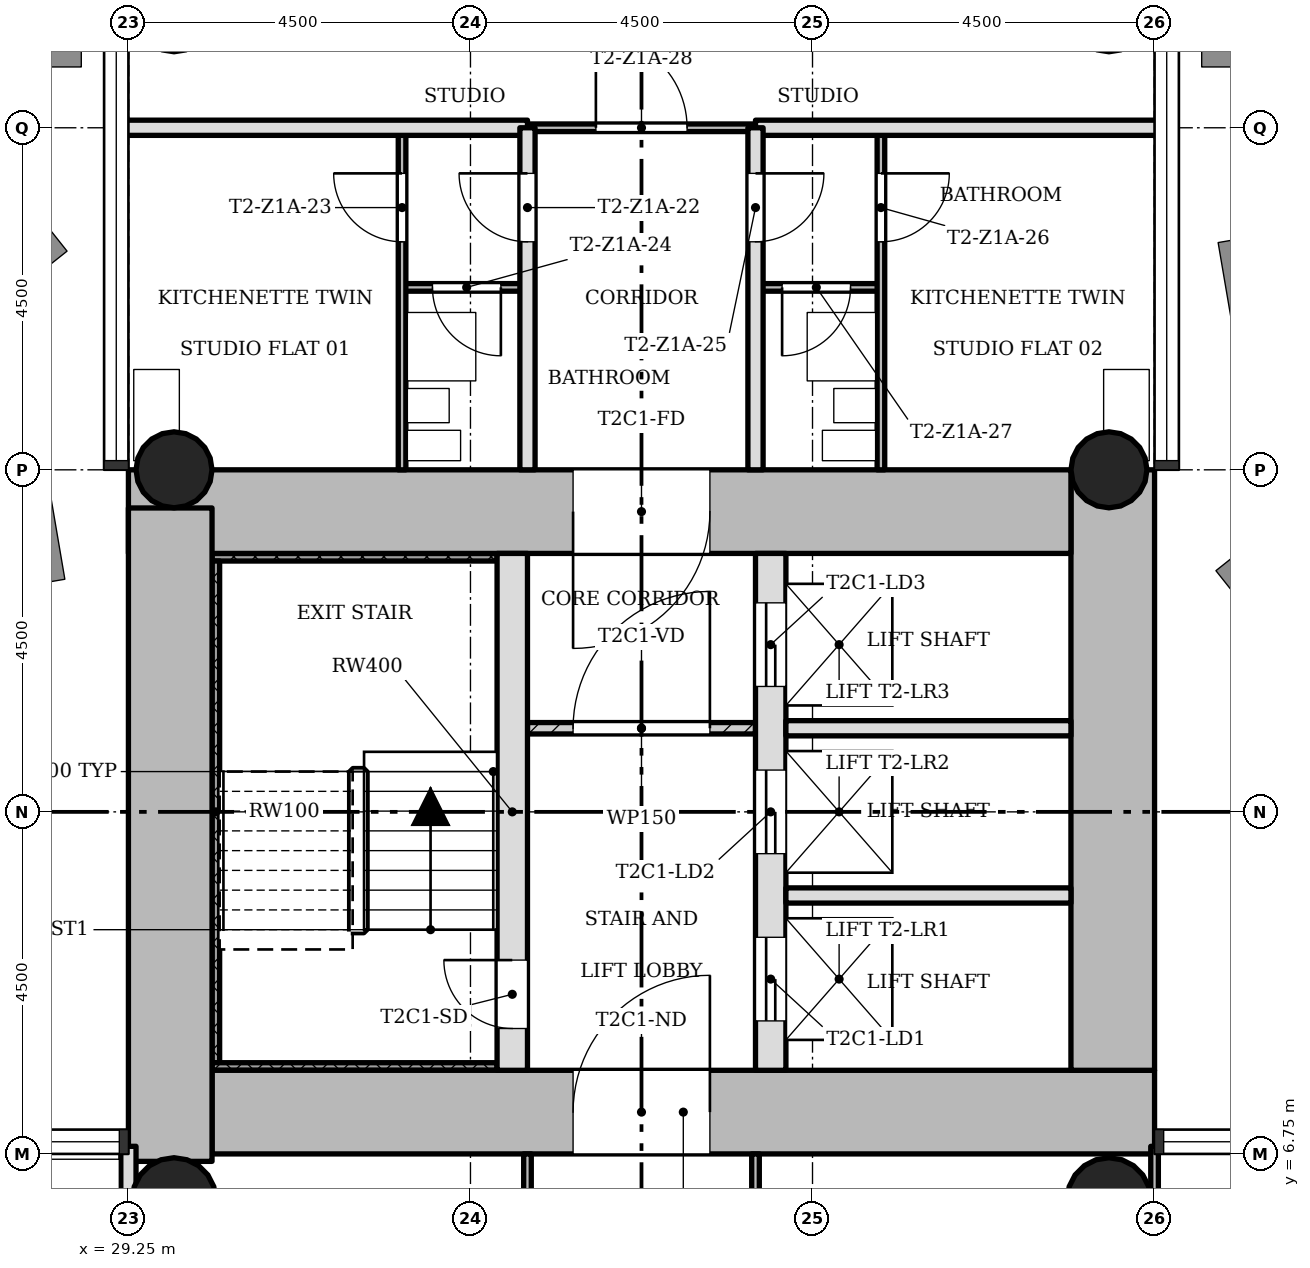
"""IFC4 building model, lengths in metres.
Left out: names, types, materials, properties, quantities, classifications, styles, units other than length and angle.
Written with IfcOpenShell. Run it as: python <this file> out.ifc"""

import sys

from ifc_helpers import new_model, si_unit, direction, frame, frame_2d, origin, origin_2d, place, context, subcontext, project, spatial, rectangle, hollow_circle, extrude, element, fill, save


model = new_model("IFC4")
c1 = context("Model", 3, precision=1e-05, world=origin(), true_north=direction((0.0, 1.0)))
c2 = subcontext(c1, "Body", "Model", "MODEL_VIEW")
j1 = project(units=[si_unit("LENGTHUNIT", "METRE"), si_unit("PLANEANGLEUNIT", "RADIAN")], contexts=[c1])
p1 = place(None, origin())
s1 = spatial("IfcSite", under=j1, at=p1, CompositionType="ELEMENT")
p2 = place(p1, origin())
s2 = spatial("IfcBuilding", under=s1, at=p2, CompositionType="ELEMENT")
p3 = place(p2, frame((0.0, 0.0, 24.5)))
s3 = spatial("IfcBuildingStorey", under=s2, at=p3, CompositionType="ELEMENT", Elevation=24.5)
p4 = place(p3, frame((30.35, 7.3, 0.0), z_axis=(0.0, 0.0, 1.0), x_axis=(1.0, 0.0, 0.0)))
e1 = element("IfcWall", 1, at=p4, inside=s3, PredefinedType="SHEAR", context=c2, shape_type="SweptSolid", body=[
    extrude(rectangle(XDim=12.4, YDim=1.1, at=frame_2d((6.2, 0.0))), origin(), (0.0, 0.0, 1.0), 3.4),
])
p5 = place(p4, frame((4.75, 0.0, 0.0)))
e2 = element("IfcOpeningElement", 2, at=p5, cuts=e1, PredefinedType="OPENING", context=c2, shape_type="SweptSolid", body=[
    extrude(rectangle(XDim=1.8, YDim=2.1, at=frame_2d((0.9, 1.05))), frame((0.0, 0.56, 0.0), z_axis=(0.0, -1.0, 0.0), x_axis=(1.0, 0.0, 0.0)), (0.0, 0.0, 1.0), 1.12),
])
p6 = place(p3, frame((42.2, 7.85, 0.0), z_axis=(0.0, 0.0, 1.0), x_axis=(0.0, 1.0, 0.0)))
e3 = element("IfcWall", 3, at=p6, inside=s3, PredefinedType="SHEAR", context=c2, shape_type="SweptSolid", body=[
    extrude(rectangle(XDim=7.9, YDim=1.1, at=frame_2d((3.95, 0.0))), origin(), (0.0, 0.0, 1.0), 3.4),
])
p7 = place(p3, frame((41.65, 15.2, 0.0), z_axis=(0.0, 0.0, 1.0), x_axis=(-1.0, 0.0, 0.0)))
e4 = element("IfcWall", 4, at=p7, inside=s3, PredefinedType="SHEAR", context=c2, shape_type="SweptSolid", body=[
    extrude(rectangle(XDim=12.4, YDim=1.1, at=frame_2d((6.2, 0.0))), origin(), (0.0, 0.0, 1.0), 3.4),
])
p8 = place(p7, frame((4.75, 0.0, 0.0)))
e5 = element("IfcOpeningElement", 5, at=p8, cuts=e4, PredefinedType="OPENING", context=c2, shape_type="SweptSolid", body=[
    extrude(rectangle(XDim=1.8, YDim=2.1, at=frame_2d((0.9, 1.05))), frame((0.0, 0.56, 0.0), z_axis=(0.0, -1.0, 0.0), x_axis=(1.0, 0.0, 0.0)), (0.0, 0.0, 1.0), 1.12),
])
p9 = place(p3, frame((29.8, 15.248, 0.0), z_axis=(0.0, 0.0, 1.0), x_axis=(0.0, -1.0, 0.0)))
e6 = element("IfcWall", 6, at=p9, inside=s3, PredefinedType="SHEAR", context=c2, shape_type="SweptSolid", body=[
    extrude(rectangle(XDim=8.596, YDim=1.1, at=frame_2d((4.298, 0.0))), origin(), (0.0, 0.0, 1.0), 3.4),
])
p10 = place(p3, frame((34.3, 7.85, 0.0), z_axis=(0.0, 0.0, 1.0), x_axis=(0.0, 1.0, 0.0)))
e7 = element("IfcWall", 7, at=p10, inside=s3, PredefinedType="SHEAR", context=c2, shape_type="SweptSolid", body=[
    extrude(rectangle(XDim=6.8, YDim=0.4, at=frame_2d((3.4, 0.0))), origin(), (0.0, 0.0, 1.0), 3.4),
])
p11 = place(p10, frame((0.55, 0.0, 0.0)))
e8 = element("IfcOpeningElement", 8, at=p11, cuts=e7, PredefinedType="OPENING", context=c2, shape_type="SweptSolid", body=[
    extrude(rectangle(XDim=0.9, YDim=2.1, at=frame_2d((0.45, 1.05))), frame((0.0, 0.21, 0.0), z_axis=(0.0, -1.0, 0.0), x_axis=(1.0, 0.0, 0.0)), (0.0, 0.0, 1.0), 0.42),
])
p12 = place(p3, frame((37.7, 7.85, 0.0), z_axis=(0.0, 0.0, 1.0), x_axis=(0.0, 1.0, 0.0)))
e9 = element("IfcWall", 9, at=p12, inside=s3, PredefinedType="SHEAR", context=c2, shape_type="SweptSolid", body=[
    extrude(rectangle(XDim=6.8, YDim=0.4, at=frame_2d((3.4, 0.0))), origin(), (0.0, 0.0, 1.0), 3.4),
])
p13 = place(p12, frame((0.65, 0.0, 0.0)))
e10 = element("IfcOpeningElement", 10, at=p13, cuts=e9, PredefinedType="OPENING", context=c2, shape_type="SweptSolid", body=[
    extrude(rectangle(XDim=1.1, YDim=2.1, at=frame_2d((0.55, 1.05))), frame((0.0, 0.21, 0.0), z_axis=(0.0, -1.0, 0.0), x_axis=(1.0, 0.0, 0.0)), (0.0, 0.0, 1.0), 0.42),
])
p14 = place(p12, frame((2.85, 0.0, 0.0)))
e11 = element("IfcOpeningElement", 11, at=p14, cuts=e9, PredefinedType="OPENING", context=c2, shape_type="SweptSolid", body=[
    extrude(rectangle(XDim=1.1, YDim=2.1, at=frame_2d((0.55, 1.05))), frame((0.0, 0.21, 0.0), z_axis=(0.0, -1.0, 0.0), x_axis=(1.0, 0.0, 0.0)), (0.0, 0.0, 1.0), 0.42),
])
p15 = place(p12, frame((5.05, 0.0, 0.0)))
e12 = element("IfcOpeningElement", 12, at=p15, cuts=e9, PredefinedType="OPENING", context=c2, shape_type="SweptSolid", body=[
    extrude(rectangle(XDim=1.1, YDim=2.1, at=frame_2d((0.55, 1.05))), frame((0.0, 0.21, 0.0), z_axis=(0.0, -1.0, 0.0), x_axis=(1.0, 0.0, 0.0)), (0.0, 0.0, 1.0), 0.42),
])
for number, where, z_axis, x_axis in (
    (13, (42.15, 15.75, 0.0), (0.0, 0.0, 1.0), (1.0, 0.0, 0.0)),
    (14, (29.85, 15.75, 0.0), (0.0, 0.0, 1.0), (1.0, 0.0, 0.0)),
):
    element("IfcColumn", number, at=place(p3, frame(where, z_axis=z_axis, x_axis=x_axis)), inside=s3, PredefinedType="COLUMN", context=c2, shape_type="SweptSolid", body=[
        extrude(hollow_circle(Radius=0.5, WallThickness=0.036, at=origin_2d()), origin(), (0.0, 0.0, 1.0), 3.4),
    ])
for number, where, z_axis, x_axis in (
    (15, (42.15, 6.15, 0.0), (0.0, 0.0, 1.0), (1.0, 0.0, 0.0)),
    (16, (29.85, 6.15, 0.0), (0.0, 0.0, 1.0), (1.0, 0.0, 0.0)),
):
    element("IfcColumn", number, at=place(p3, frame(where, z_axis=z_axis, x_axis=x_axis)), inside=s3, PredefinedType="COLUMN", context=c2, shape_type="SweptSolid", body=[
        extrude(hollow_circle(Radius=0.55, WallThickness=0.04, at=origin_2d()), origin(), (0.0, 0.0, 1.0), 3.4),
    ])
p16 = place(p3, frame((37.5, 12.35, 0.0), z_axis=(0.0, 0.0, 1.0), x_axis=(-1.0, 0.0, 0.0)))
e17 = element("IfcWall", 17, at=p16, inside=s3, PredefinedType="PARTITIONING", context=c2, shape_type="SweptSolid", body=[
    extrude(rectangle(XDim=3.0, YDim=0.15, at=frame_2d((1.5, 0.0))), origin(), (0.0, 0.0, 1.0), 3.0),
])
p17 = place(p16, frame((0.6, 0.0, 0.0)))
e18 = element("IfcOpeningElement", 18, at=p17, cuts=e17, PredefinedType="OPENING", context=c2, shape_type="SweptSolid", body=[
    extrude(rectangle(XDim=1.8, YDim=2.1, at=frame_2d((0.9, 1.05))), frame((0.0, 0.085, 0.0), z_axis=(0.0, -1.0, 0.0), x_axis=(1.0, 0.0, 0.0)), (0.0, 0.0, 1.0), 0.17),
])
for number, where, z_axis, x_axis in (
    (19, (41.65, 10.15, 0.0), (0.0, 0.0, 1.0), (-1.0, 0.0, 0.0)),
    (20, (41.65, 12.35, 0.0), (0.0, 0.0, 1.0), (-1.0, 0.0, 0.0)),
):
    element("IfcWall", number, at=place(p3, frame(where, z_axis=z_axis, x_axis=x_axis)), inside=s3, PredefinedType="SOLIDWALL", context=c2, shape_type="SweptSolid", body=[
        extrude(rectangle(XDim=3.75, YDim=0.2, at=frame_2d((1.875, 0.0))), origin(), (0.0, 0.0, 1.0), 3.0),
    ])
p18 = place(p3, frame((39.15, 18.15, 0.0), z_axis=(0.0, 0.0, 1.0), x_axis=(-1.0, 0.0, 0.0)))
e21 = element("IfcWall", 21, at=p18, inside=s3, PredefinedType="PARTITIONING", context=c2, shape_type="SweptSolid", body=[
    extrude(rectangle(XDim=1.65, YDim=0.1, at=frame_2d((0.825, 0.0))), origin(), (0.0, 0.0, 1.0), 3.0),
])
p19 = place(p18, frame((0.4, 0.0, 0.0)))
e22 = element("IfcOpeningElement", 22, at=p19, cuts=e21, PredefinedType="OPENING", context=c2, shape_type="SweptSolid", body=[
    extrude(rectangle(XDim=0.9, YDim=2.1, at=frame_2d((0.45, 1.05))), frame((0.0, 0.06, 0.0), z_axis=(0.0, -1.0, 0.0), x_axis=(1.0, 0.0, 0.0)), (0.0, 0.0, 1.0), 0.12),
])
p20 = place(p3, frame((34.5, 18.15, 0.0), z_axis=(0.0, 0.0, 1.0), x_axis=(-1.0, 0.0, 0.0)))
e23 = element("IfcWall", 23, at=p20, inside=s3, PredefinedType="PARTITIONING", context=c2, shape_type="SweptSolid", body=[
    extrude(rectangle(XDim=1.65, YDim=0.1, at=frame_2d((0.825, 0.0))), origin(), (0.0, 0.0, 1.0), 3.0),
])
p21 = place(p20, frame((0.35, 0.0, 0.0)))
e24 = element("IfcOpeningElement", 24, at=p21, cuts=e23, PredefinedType="OPENING", context=c2, shape_type="SweptSolid", body=[
    extrude(rectangle(XDim=0.9, YDim=2.1, at=frame_2d((0.45, 1.05))), frame((0.0, 0.06, 0.0), z_axis=(0.0, -1.0, 0.0), x_axis=(1.0, 0.0, 0.0)), (0.0, 0.0, 1.0), 0.12),
])
p22 = place(p3, frame((37.5, 20.25, 0.0), z_axis=(0.0, 0.0, 1.0), x_axis=(-1.0, 0.0, 0.0)))
e25 = element("IfcWall", 25, at=p22, inside=s3, PredefinedType="PARTITIONING", context=c2, shape_type="SweptSolid", body=[
    extrude(rectangle(XDim=3.0, YDim=0.1, at=frame_2d((1.5, 0.0))), origin(), (0.0, 0.0, 1.0), 3.0),
])
p23 = place(p22, frame((0.9, 0.0, 0.0)))
e26 = element("IfcOpeningElement", 26, at=p23, cuts=e25, PredefinedType="OPENING", context=c2, shape_type="SweptSolid", body=[
    extrude(rectangle(XDim=1.2, YDim=2.1, at=frame_2d((0.6, 1.05))), frame((0.0, 0.06, 0.0), z_axis=(0.0, -1.0, 0.0), x_axis=(1.0, 0.0, 0.0)), (0.0, 0.0, 1.0), 0.12),
])
for number, where, z_axis, x_axis in (
    (27, (42.85, 20.25, 0.0), (0.0, 0.0, 1.0), (-1.0, 0.0, 0.0)),
    (28, (34.5, 20.25, 0.0), (0.0, 0.0, 1.0), (-1.0, 0.0, 0.0)),
):
    element("IfcWall", number, at=place(p3, frame(where, z_axis=z_axis, x_axis=x_axis)), inside=s3, PredefinedType="SOLIDWALL", context=c2, shape_type="SweptSolid", body=[
        extrude(rectangle(XDim=5.35, YDim=0.2, at=frame_2d((2.675, 0.0))), origin(), (0.0, 0.0, 1.0), 3.0),
    ])
p24 = place(p3, frame((42.75, 0.9, 0.0), z_axis=(0.0, 0.0, 1.0), x_axis=(0.0, 1.0, 0.0)))
e29 = element("IfcWall", 29, at=p24, inside=s3, PredefinedType="PARTITIONING", context=c2, shape_type="SweptSolid", body=[
    extrude(rectangle(XDim=5.95, YDim=0.1, at=frame_2d((2.975, 0.0))), origin(), (0.0, 0.0, 1.0), 3.0),
])
p25 = place(p3, frame((39.15, 15.75, 0.0), z_axis=(0.0, 0.0, 1.0), x_axis=(0.0, 1.0, 0.0)))
e30 = element("IfcWall", 30, at=p25, inside=s3, PredefinedType="PARTITIONING", context=c2, shape_type="SweptSolid", body=[
    extrude(rectangle(XDim=4.5, YDim=0.1, at=frame_2d((2.25, 0.0))), origin(), (0.0, 0.0, 1.0), 3.0),
])
p26 = place(p25, frame((3.0, 0.0, 0.0)))
e31 = element("IfcOpeningElement", 31, at=p26, cuts=e30, PredefinedType="OPENING", context=c2, shape_type="SweptSolid", body=[
    extrude(rectangle(XDim=0.9, YDim=2.1, at=frame_2d((0.45, 1.05))), frame((0.0, 0.06, 0.0), z_axis=(0.0, -1.0, 0.0), x_axis=(1.0, 0.0, 0.0)), (0.0, 0.0, 1.0), 0.12),
])
p27 = place(p3, frame((37.5, 0.9, 0.0), z_axis=(0.0, 0.0, 1.0), x_axis=(0.0, 1.0, 0.0)))
e32 = element("IfcWall", 32, at=p27, inside=s3, PredefinedType="PARTITIONING", context=c2, shape_type="SweptSolid", body=[
    extrude(rectangle(XDim=5.85, YDim=0.1, at=frame_2d((2.925, 0.0))), origin(), (0.0, 0.0, 1.0), 3.0),
])
p28 = place(p27, frame((2.475, 0.0, 0.0)))
e33 = element("IfcOpeningElement", 33, at=p28, cuts=e32, PredefinedType="OPENING", context=c2, shape_type="SweptSolid", body=[
    extrude(rectangle(XDim=0.9, YDim=2.1, at=frame_2d((0.45, 1.05))), frame((0.0, 0.06, 0.0), z_axis=(0.0, -1.0, 0.0), x_axis=(1.0, 0.0, 0.0)), (0.0, 0.0, 1.0), 0.12),
])
p29 = place(p3, frame((37.5, 15.75, 0.0), z_axis=(0.0, 0.0, 1.0), x_axis=(0.0, 1.0, 0.0)))
e34 = element("IfcWall", 34, at=p29, inside=s3, PredefinedType="SOLIDWALL", context=c2, shape_type="SweptSolid", body=[
    extrude(rectangle(XDim=4.5, YDim=0.2, at=frame_2d((2.25, 0.0))), origin(), (0.0, 0.0, 1.0), 3.0),
])
p30 = place(p29, frame((3.0, 0.0, 0.0)))
e35 = element("IfcOpeningElement", 35, at=p30, cuts=e34, PredefinedType="OPENING", context=c2, shape_type="SweptSolid", body=[
    extrude(rectangle(XDim=0.9, YDim=2.1, at=frame_2d((0.45, 1.05))), frame((0.0, 0.11, 0.0), z_axis=(0.0, -1.0, 0.0), x_axis=(1.0, 0.0, 0.0)), (0.0, 0.0, 1.0), 0.22),
])
p31 = place(p3, frame((34.5, 0.9, 0.0), z_axis=(0.0, 0.0, 1.0), x_axis=(0.0, 1.0, 0.0)))
e36 = element("IfcWall", 36, at=p31, inside=s3, PredefinedType="PARTITIONING", context=c2, shape_type="SweptSolid", body=[
    extrude(rectangle(XDim=5.85, YDim=0.1, at=frame_2d((2.925, 0.0))), origin(), (0.0, 0.0, 1.0), 3.0),
])
p32 = place(p31, frame((2.475, 0.0, 0.0)))
e37 = element("IfcOpeningElement", 37, at=p32, cuts=e36, PredefinedType="OPENING", context=c2, shape_type="SweptSolid", body=[
    extrude(rectangle(XDim=0.9, YDim=2.1, at=frame_2d((0.45, 1.05))), frame((0.0, 0.06, 0.0), z_axis=(0.0, -1.0, 0.0), x_axis=(1.0, 0.0, 0.0)), (0.0, 0.0, 1.0), 0.12),
])
p33 = place(p3, frame((34.5, 15.75, 0.0), z_axis=(0.0, 0.0, 1.0), x_axis=(0.0, 1.0, 0.0)))
e38 = element("IfcWall", 38, at=p33, inside=s3, PredefinedType="SOLIDWALL", context=c2, shape_type="SweptSolid", body=[
    extrude(rectangle(XDim=4.5, YDim=0.2, at=frame_2d((2.25, 0.0))), origin(), (0.0, 0.0, 1.0), 3.0),
])
p34 = place(p33, frame((3.0, 0.0, 0.0)))
e39 = element("IfcOpeningElement", 39, at=p34, cuts=e38, PredefinedType="OPENING", context=c2, shape_type="SweptSolid", body=[
    extrude(rectangle(XDim=0.9, YDim=2.1, at=frame_2d((0.45, 1.05))), frame((0.0, 0.11, 0.0), z_axis=(0.0, -1.0, 0.0), x_axis=(1.0, 0.0, 0.0)), (0.0, 0.0, 1.0), 0.22),
])
p35 = place(p3, frame((32.85, 15.75, 0.0), z_axis=(0.0, 0.0, 1.0), x_axis=(0.0, 1.0, 0.0)))
e40 = element("IfcWall", 40, at=p35, inside=s3, PredefinedType="PARTITIONING", context=c2, shape_type="SweptSolid", body=[
    extrude(rectangle(XDim=4.5, YDim=0.1, at=frame_2d((2.25, 0.0))), origin(), (0.0, 0.0, 1.0), 3.0),
])
p36 = place(p35, frame((3.0, 0.0, 0.0)))
e41 = element("IfcOpeningElement", 41, at=p36, cuts=e40, PredefinedType="OPENING", context=c2, shape_type="SweptSolid", body=[
    extrude(rectangle(XDim=0.9, YDim=2.1, at=frame_2d((0.45, 1.05))), frame((0.0, 0.06, 0.0), z_axis=(0.0, -1.0, 0.0), x_axis=(1.0, 0.0, 0.0)), (0.0, 0.0, 1.0), 0.12),
])
p37 = place(p3, frame((29.25, -6.85, 0.0), z_axis=(0.0, 0.0, 1.0), x_axis=(0.0, 1.0, 0.0)))
e42 = element("IfcWall", 42, at=p37, inside=s3, PredefinedType="SOLIDWALL", context=c2, shape_type="SweptSolid", body=[
    extrude(rectangle(XDim=13.7, YDim=0.2, at=frame_2d((6.85, 0.0))), origin(), (0.0, 0.0, 1.0), 3.0),
])
p38 = place(p37, frame((6.4, 0.0, 0.0)))
e43 = element("IfcOpeningElement", 43, at=p38, cuts=e42, PredefinedType="OPENING", context=c2, shape_type="SweptSolid", body=[
    extrude(rectangle(XDim=0.9, YDim=2.1, at=frame_2d((0.45, 1.05))), frame((0.0, 0.11, 0.0), z_axis=(0.0, -1.0, 0.0), x_axis=(1.0, 0.0, 0.0)), (0.0, 0.0, 1.0), 0.22),
])
p39 = place(p3, frame((34.1, 14.6, 0.0), z_axis=(0.0, 0.0, 1.0), x_axis=(-1.0, 0.0, 0.0)))
e44 = element("IfcWall", 44, at=p39, inside=s3, PredefinedType="SHEAR", context=c2, shape_type="SweptSolid", body=[
    extrude(rectangle(XDim=3.75, YDim=0.1, at=frame_2d((1.875, 0.0))), origin(), (0.0, 0.0, 1.0), 3.4),
])
p40 = place(p3, frame((30.4, 7.95, 0.0), z_axis=(0.0, 0.0, 1.0), x_axis=(0.0, 1.0, 0.0)))
e45 = element("IfcWall", 45, at=p40, inside=s3, PredefinedType="SHEAR", context=c2, shape_type="SweptSolid", body=[
    extrude(rectangle(XDim=6.6, YDim=0.1, at=frame_2d((3.3, 0.0))), origin(), (0.0, 0.0, 1.0), 3.4),
])
p41 = place(p3, frame((34.1, 7.9, 0.0), z_axis=(0.0, 0.0, 1.0), x_axis=(-1.0, 0.0, 0.0)))
e46 = element("IfcWall", 46, at=p41, inside=s3, PredefinedType="SHEAR", context=c2, shape_type="SweptSolid", body=[
    extrude(rectangle(XDim=3.75, YDim=0.1, at=frame_2d((1.875, 0.0))), origin(), (0.0, 0.0, 1.0), 3.4),
])
p42 = place(p17, origin())
e47 = element("IfcDoor", 47, at=p42, inside=s3, OperationType="SINGLE_SWING_LEFT", PredefinedType="DOOR", context=c2, shape_type="SweptSolid", body=[
    extrude(rectangle(XDim=1.8, YDim=2.1, at=frame_2d((0.9, 1.05))), frame((0.0, 0.025, 0.0), z_axis=(0.0, -1.0, 0.0), x_axis=(1.0, 0.0, 0.0)), (0.0, 0.0, 1.0), 0.05),
])
fill(e18, e47)
p43 = place(p34, origin())
e48 = element("IfcDoor", 48, at=p43, inside=s3, OperationType="SINGLE_SWING_LEFT", PredefinedType="DOOR", context=c2, shape_type="SweptSolid", body=[
    extrude(rectangle(XDim=0.9, YDim=2.1, at=frame_2d((0.45, 1.05))), frame((0.0, 0.025, 0.0), z_axis=(0.0, -1.0, 0.0), x_axis=(1.0, 0.0, 0.0)), (0.0, 0.0, 1.0), 0.05),
])
fill(e39, e48)
p44 = place(p36, origin())
e49 = element("IfcDoor", 49, at=p44, inside=s3, OperationType="SINGLE_SWING_LEFT", PredefinedType="DOOR", context=c2, shape_type="SweptSolid", body=[
    extrude(rectangle(XDim=0.9, YDim=2.1, at=frame_2d((0.45, 1.05))), frame((0.0, 0.025, 0.0), z_axis=(0.0, -1.0, 0.0), x_axis=(1.0, 0.0, 0.0)), (0.0, 0.0, 1.0), 0.05),
])
fill(e41, e49)
p45 = place(p21, origin())
e50 = element("IfcDoor", 50, at=p45, inside=s3, OperationType="SINGLE_SWING_RIGHT", PredefinedType="DOOR", context=c2, shape_type="SweptSolid", body=[
    extrude(rectangle(XDim=0.9, YDim=2.1, at=frame_2d((0.45, 1.05))), frame((0.0, 0.025, 0.0), z_axis=(0.0, -1.0, 0.0), x_axis=(1.0, 0.0, 0.0)), (0.0, 0.0, 1.0), 0.05),
])
fill(e24, e50)
p46 = place(p30, origin())
e51 = element("IfcDoor", 51, at=p46, inside=s3, OperationType="SINGLE_SWING_RIGHT", PredefinedType="DOOR", context=c2, shape_type="SweptSolid", body=[
    extrude(rectangle(XDim=0.9, YDim=2.1, at=frame_2d((0.45, 1.05))), frame((0.0, 0.025, 0.0), z_axis=(0.0, -1.0, 0.0), x_axis=(1.0, 0.0, 0.0)), (0.0, 0.0, 1.0), 0.05),
])
fill(e35, e51)
p47 = place(p26, origin())
e52 = element("IfcDoor", 52, at=p47, inside=s3, OperationType="SINGLE_SWING_RIGHT", PredefinedType="DOOR", context=c2, shape_type="SweptSolid", body=[
    extrude(rectangle(XDim=0.9, YDim=2.1, at=frame_2d((0.45, 1.05))), frame((0.0, 0.025, 0.0), z_axis=(0.0, -1.0, 0.0), x_axis=(1.0, 0.0, 0.0)), (0.0, 0.0, 1.0), 0.05),
])
fill(e31, e52)
p48 = place(p19, origin())
e53 = element("IfcDoor", 53, at=p48, inside=s3, OperationType="SINGLE_SWING_LEFT", PredefinedType="DOOR", context=c2, shape_type="SweptSolid", body=[
    extrude(rectangle(XDim=0.9, YDim=2.1, at=frame_2d((0.45, 1.05))), frame((0.0, 0.025, 0.0), z_axis=(0.0, -1.0, 0.0), x_axis=(1.0, 0.0, 0.0)), (0.0, 0.0, 1.0), 0.05),
])
fill(e22, e53)
p49 = place(p23, origin())
e54 = element("IfcDoor", 54, at=p49, inside=s3, OperationType="SINGLE_SWING_RIGHT", PredefinedType="DOOR", context=c2, shape_type="SweptSolid", body=[
    extrude(rectangle(XDim=1.2, YDim=2.1, at=frame_2d((0.6, 1.05))), frame((0.0, 0.025, 0.0), z_axis=(0.0, -1.0, 0.0), x_axis=(1.0, 0.0, 0.0)), (0.0, 0.0, 1.0), 0.05),
])
fill(e26, e54)
p50 = place(p11, origin())
e55 = element("IfcDoor", 55, at=p50, inside=s3, OperationType="SINGLE_SWING_LEFT", PredefinedType="DOOR", context=c2, shape_type="SweptSolid", body=[
    extrude(rectangle(XDim=0.9, YDim=2.1, at=frame_2d((0.45, 1.05))), frame((0.0, 0.025, 0.0), z_axis=(0.0, -1.0, 0.0), x_axis=(1.0, 0.0, 0.0)), (0.0, 0.0, 1.0), 0.05),
])
fill(e8, e55)
p51 = place(p13, origin())
e56 = element("IfcDoor", 56, at=p51, inside=s3, OperationType="SLIDING_TO_LEFT", PredefinedType="DOOR", context=c2, shape_type="SweptSolid", body=[
    extrude(rectangle(XDim=1.1, YDim=2.1, at=frame_2d((0.55, 1.05))), frame((0.0, 0.025, 0.0), z_axis=(0.0, -1.0, 0.0), x_axis=(1.0, 0.0, 0.0)), (0.0, 0.0, 1.0), 0.05),
])
fill(e10, e56)
p52 = place(p14, origin())
e57 = element("IfcDoor", 57, at=p52, inside=s3, OperationType="SLIDING_TO_LEFT", PredefinedType="DOOR", context=c2, shape_type="SweptSolid", body=[
    extrude(rectangle(XDim=1.1, YDim=2.1, at=frame_2d((0.55, 1.05))), frame((0.0, 0.025, 0.0), z_axis=(0.0, -1.0, 0.0), x_axis=(1.0, 0.0, 0.0)), (0.0, 0.0, 1.0), 0.05),
])
fill(e11, e57)
p53 = place(p15, origin())
e58 = element("IfcDoor", 58, at=p53, inside=s3, OperationType="SLIDING_TO_LEFT", PredefinedType="DOOR", context=c2, shape_type="SweptSolid", body=[
    extrude(rectangle(XDim=1.1, YDim=2.1, at=frame_2d((0.55, 1.05))), frame((0.0, 0.025, 0.0), z_axis=(0.0, -1.0, 0.0), x_axis=(1.0, 0.0, 0.0)), (0.0, 0.0, 1.0), 0.05),
])
fill(e12, e58)
p54 = place(p5, origin())
e59 = element("IfcDoor", 59, at=p54, inside=s3, OperationType="SINGLE_SWING_LEFT", PredefinedType="DOOR", context=c2, shape_type="SweptSolid", body=[
    extrude(rectangle(XDim=1.8, YDim=2.1, at=frame_2d((0.9, 1.05))), frame((0.0, 0.025, 0.0), z_axis=(0.0, -1.0, 0.0), x_axis=(1.0, 0.0, 0.0)), (0.0, 0.0, 1.0), 0.05),
])
fill(e2, e59)
p55 = place(p8, origin())
e60 = element("IfcDoor", 60, at=p55, inside=s3, OperationType="SINGLE_SWING_LEFT", PredefinedType="DOOR", context=c2, shape_type="SweptSolid", body=[
    extrude(rectangle(XDim=1.8, YDim=2.1, at=frame_2d((0.9, 1.05))), frame((0.0, 0.025, 0.0), z_axis=(0.0, -1.0, 0.0), x_axis=(1.0, 0.0, 0.0)), (0.0, 0.0, 1.0), 0.05),
])
fill(e5, e60)
save(model, sys.argv[1])
